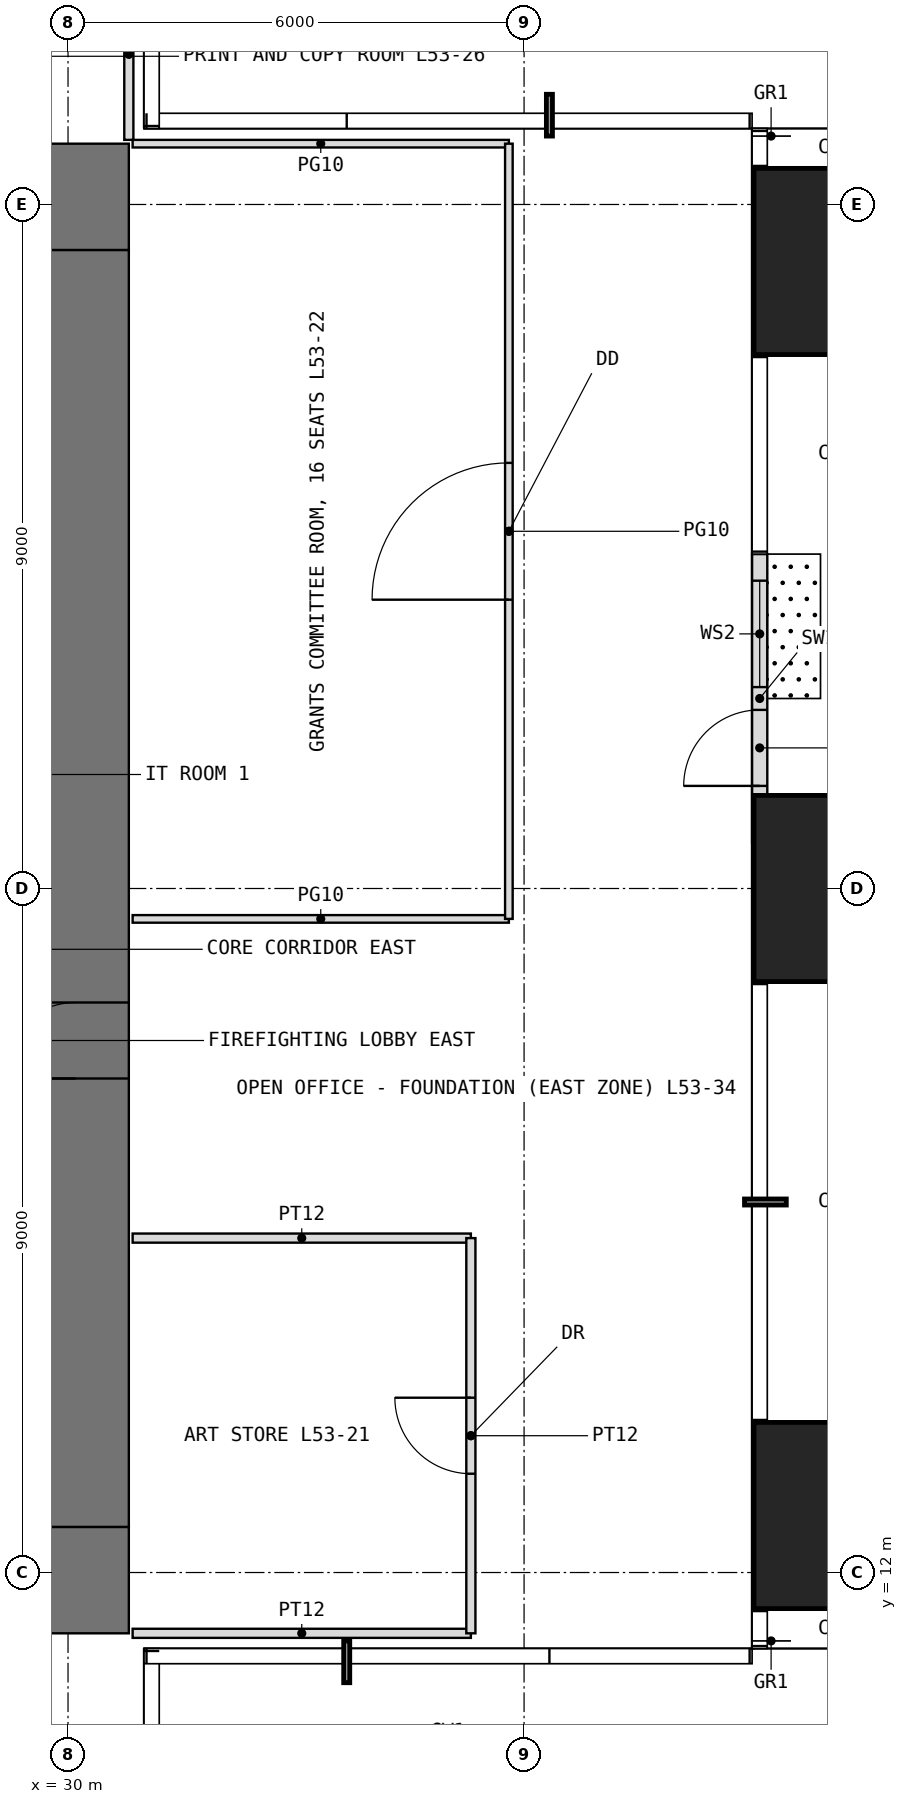
"""IFC4 building model, lengths in metres.
Left out: names, types, materials, properties, quantities, classifications, styles, units other than length and angle.
Written with IfcOpenShell. Run it as: python <this file> out.ifc"""

import sys

from ifc_helpers import new_model, si_unit, direction, frame, frame_2d, origin, origin_2d, place, context, subcontext, project, spatial, rectangle, extrude, element, fill, save


model = new_model("IFC4")
c1 = context("Model", 3, precision=1e-05, world=origin(), true_north=direction((0.0, 1.0)))
c2 = subcontext(c1, "Body", "Model", "MODEL_VIEW")
j1 = project(units=[si_unit("LENGTHUNIT", "METRE"), si_unit("PLANEANGLEUNIT", "RADIAN")], contexts=[c1])
p1 = place(None, origin())
s1 = spatial("IfcSite", under=j1, at=p1, CompositionType="ELEMENT")
p2 = place(p1, origin())
s2 = spatial("IfcBuilding", under=s1, at=p2, CompositionType="ELEMENT")
p3 = place(p2, frame((0.0, 0.0, 222.5)))
s3 = spatial("IfcBuildingStorey", under=s2, at=p3, CompositionType="ELEMENT", Elevation=222.5)
for number, where, z_axis, x_axis in (
    (1, (40.25, 12.75, 0.0), (0.0, 0.0, 1.0), (1.0, 0.0, 0.0)),
    (2, (40.25, 21.0, 0.0), (0.0, 0.0, 1.0), (1.0, 0.0, 0.0)),
    (3, (40.25, 29.25, 0.0), (0.0, 0.0, 1.0), (1.0, 0.0, 0.0)),
):
    element("IfcColumn", number, at=place(p3, frame(where, z_axis=z_axis, x_axis=x_axis)), inside=s3, PredefinedType="COLUMN", context=c2, shape_type="SweptSolid", body=[
        extrude(rectangle(XDim=2.45, YDim=2.45, at=origin_2d()), origin(), (0.0, 0.0, 1.0), 4.0),
    ])
p4 = place(p3, frame((39.1, 21.6, 0.0), z_axis=(0.0, 0.0, 1.0), x_axis=(0.0, 1.0, 0.0)))
e4 = element("IfcWall", 4, at=p4, inside=s3, PredefinedType="USERDEFINED", context=c2, shape_type="SweptSolid", body=[
    extrude(rectangle(XDim=3.8, YDim=0.2, at=frame_2d((1.9, 0.0))), origin(), (0.0, 0.0, 1.0), 3.75),
])
p5 = place(p4, frame((0.75, 0.0, 0.0)))
e5 = element("IfcOpeningElement", 5, at=p5, cuts=e4, PredefinedType="OPENING", context=c2, shape_type="SweptSolid", body=[
    extrude(rectangle(XDim=1.0, YDim=2.4, at=frame_2d((0.5, 1.2))), frame((0.0, 0.11, 0.0), z_axis=(0.0, -1.0, 0.0), x_axis=(1.0, 0.0, 0.0)), (0.0, 0.0, 1.0), 0.22),
])
p6 = place(p4, frame((2.05, 0.0, 0.3)))
e6 = element("IfcOpeningElement", 6, at=p6, cuts=e4, PredefinedType="OPENING", context=c2, shape_type="SweptSolid", body=[
    extrude(rectangle(XDim=1.4, YDim=2.7, at=frame_2d((0.7, 1.35))), frame((0.0, 0.11, 0.0), z_axis=(0.0, -1.0, 0.0), x_axis=(1.0, 0.0, 0.0)), (0.0, 0.0, 1.0), 0.22),
])
p7 = place(p3, frame((11.2, 11.9, -0.05), z_axis=(0.0, 0.0, 1.0), x_axis=(1.0, 0.0, 0.0)))
e7 = element("IfcWall", 7, at=p7, inside=s3, PredefinedType="SHEAR", context=c2, shape_type="SweptSolid", body=[
    extrude(rectangle(XDim=19.6, YDim=1.4, at=frame_2d((9.8, 0.0))), origin(), (0.0, 0.0, 1.0), 4.0),
])
p8 = place(p7, frame((8.8, 0.0, 0.05)))
e8 = element("IfcOpeningElement", 8, at=p8, cuts=e7, PredefinedType="OPENING", context=c2, shape_type="SweptSolid", body=[
    extrude(rectangle(XDim=2.0, YDim=2.2, at=frame_2d((1.0, 1.1))), frame((0.0, 0.71, 0.0), z_axis=(0.0, -1.0, 0.0), x_axis=(1.0, 0.0, 0.0)), (0.0, 0.0, 1.0), 1.42),
])
p9 = place(p3, frame((11.2, 30.1, -0.05), z_axis=(0.0, 0.0, 1.0), x_axis=(1.0, 0.0, 0.0)))
e9 = element("IfcWall", 9, at=p9, inside=s3, PredefinedType="SHEAR", context=c2, shape_type="SweptSolid", body=[
    extrude(rectangle(XDim=19.6, YDim=1.4, at=frame_2d((9.8, 0.0))), origin(), (0.0, 0.0, 1.0), 4.0),
])
p10 = place(p9, frame((8.8, 0.0, 0.05)))
e10 = element("IfcOpeningElement", 10, at=p10, cuts=e9, PredefinedType="OPENING", context=c2, shape_type="SweptSolid", body=[
    extrude(rectangle(XDim=2.0, YDim=2.2, at=frame_2d((1.0, 1.1))), frame((0.0, 0.71, 0.0), z_axis=(0.0, -1.0, 0.0), x_axis=(1.0, 0.0, 0.0)), (0.0, 0.0, 1.0), 1.42),
])
p11 = place(p3, frame((30.1, 12.6, -0.05), z_axis=(0.0, 0.0, 1.0), x_axis=(0.0, 1.0, 0.0)))
e11 = element("IfcWall", 11, at=p11, inside=s3, PredefinedType="SHEAR", context=c2, shape_type="SweptSolid", body=[
    extrude(rectangle(XDim=16.8, YDim=1.4, at=frame_2d((8.4, 0.0))), origin(), (0.0, 0.0, 1.0), 4.0),
])
p12 = place(p11, frame((5.9, 0.0, 0.05)))
e12 = element("IfcOpeningElement", 12, at=p12, cuts=e11, PredefinedType="OPENING", context=c2, shape_type="SweptSolid", body=[
    extrude(rectangle(XDim=1.0, YDim=2.2, at=frame_2d((0.5, 1.1))), frame((0.0, 0.71, 0.0), z_axis=(0.0, -1.0, 0.0), x_axis=(1.0, 0.0, 0.0)), (0.0, 0.0, 1.0), 1.42),
])
p13 = place(p3, frame((30.8, 30.85, 0.0), z_axis=(0.0, 0.0, 1.0), x_axis=(0.0, 1.0, 0.0)))
e13 = element("IfcWall", 13, at=p13, inside=s3, PredefinedType="PARTITIONING", context=c2, shape_type="SweptSolid", body=[
    extrude(rectangle(XDim=2.25, YDim=0.12, at=frame_2d((1.125, 0.0))), origin(), (0.0, 0.0, 1.0), 3.75),
])
for number, where, z_axis, x_axis in (
    (14, (30.85, 11.2, 0.0), (0.0, 0.0, 1.0), (1.0, 0.0, 0.0)),
    (15, (30.85, 16.4, 0.0), (0.0, 0.0, 1.0), (1.0, 0.0, 0.0)),
):
    element("IfcWall", number, at=place(p3, frame(where, z_axis=z_axis, x_axis=x_axis)), inside=s3, PredefinedType="PARTITIONING", context=c2, shape_type="SweptSolid", body=[
        extrude(rectangle(XDim=4.45, YDim=0.12, at=frame_2d((2.225, 0.0))), origin(), (0.0, 0.0, 1.0), 3.75),
    ])
for number, where, z_axis, x_axis in (
    (16, (30.85, 20.6, 0.0), (0.0, 0.0, 1.0), (1.0, 0.0, 0.0)),
    (17, (30.85, 30.8, 0.0), (0.0, 0.0, 1.0), (1.0, 0.0, 0.0)),
):
    element("IfcWall", number, at=place(p3, frame(where, z_axis=z_axis, x_axis=x_axis)), inside=s3, PredefinedType="PARTITIONING", context=c2, shape_type="SweptSolid", body=[
        extrude(rectangle(XDim=4.95, YDim=0.1, at=frame_2d((2.475, 0.0))), origin(), (0.0, 0.0, 1.0), 3.75),
    ])
p14 = place(p3, frame((35.3, 11.2, 0.0), z_axis=(0.0, 0.0, 1.0), x_axis=(0.0, 1.0, 0.0)))
e18 = element("IfcWall", 18, at=p14, inside=s3, PredefinedType="PARTITIONING", context=c2, shape_type="SweptSolid", body=[
    extrude(rectangle(XDim=5.2, YDim=0.12, at=frame_2d((2.6, 0.0))), origin(), (0.0, 0.0, 1.0), 3.75),
])
p15 = place(p14, frame((2.1, 0.0, 0.0)))
e19 = element("IfcOpeningElement", 19, at=p15, cuts=e18, PredefinedType="OPENING", context=c2, shape_type="SweptSolid", body=[
    extrude(rectangle(XDim=1.0, YDim=2.2, at=frame_2d((0.5, 1.1))), frame((0.0, 0.07, 0.0), z_axis=(0.0, -1.0, 0.0), x_axis=(1.0, 0.0, 0.0)), (0.0, 0.0, 1.0), 0.14),
])
p16 = place(p3, frame((35.8, 20.6, 0.0), z_axis=(0.0, 0.0, 1.0), x_axis=(0.0, 1.0, 0.0)))
e20 = element("IfcWall", 20, at=p16, inside=s3, PredefinedType="PARTITIONING", context=c2, shape_type="SweptSolid", body=[
    extrude(rectangle(XDim=10.2, YDim=0.1, at=frame_2d((5.1, 0.0))), origin(), (0.0, 0.0, 1.0), 3.75),
])
p17 = place(p16, frame((4.2, 0.0, 0.0)))
e21 = element("IfcOpeningElement", 21, at=p17, cuts=e20, PredefinedType="OPENING", context=c2, shape_type="SweptSolid", body=[
    extrude(rectangle(XDim=1.8, YDim=2.4, at=frame_2d((0.9, 1.2))), frame((0.0, 0.06, 0.0), z_axis=(0.0, -1.0, 0.0), x_axis=(1.0, 0.0, 0.0)), (0.0, 0.0, 1.0), 0.12),
])
p18 = place(p5, origin())
e22 = element("IfcDoor", 22, at=p18, inside=s3, OperationType="SINGLE_SWING_LEFT", PredefinedType="DOOR", context=c2, shape_type="SweptSolid", body=[
    extrude(rectangle(XDim=1.0, YDim=2.4, at=frame_2d((0.5, 1.2))), frame((0.0, 0.025, 0.0), z_axis=(0.0, -1.0, 0.0), x_axis=(1.0, 0.0, 0.0)), (0.0, 0.0, 1.0), 0.05),
])
fill(e5, e22)
p19 = place(p6, origin())
e23 = element("IfcWindow", 23, at=p19, inside=s3, PartitioningType="SINGLE_PANEL", PredefinedType="WINDOW", context=c2, shape_type="SweptSolid", body=[
    extrude(rectangle(XDim=1.4, YDim=2.7, at=frame_2d((0.7, 1.35))), frame((0.0, 0.03, 0.0), z_axis=(0.0, -1.0, 0.0), x_axis=(1.0, 0.0, 0.0)), (0.0, 0.0, 1.0), 0.06),
])
fill(e6, e23)
p20 = place(p12, origin())
e24 = element("IfcDoor", 24, at=p20, inside=s3, OperationType="SINGLE_SWING_LEFT", PredefinedType="DOOR", context=c2, shape_type="SweptSolid", body=[
    extrude(rectangle(XDim=1.0, YDim=2.2, at=frame_2d((0.5, 1.1))), frame((0.0, 0.025, 0.0), z_axis=(0.0, -1.0, 0.0), x_axis=(1.0, 0.0, 0.0)), (0.0, 0.0, 1.0), 0.05),
])
fill(e12, e24)
p21 = place(p15, origin())
e25 = element("IfcDoor", 25, at=p21, inside=s3, OperationType="SINGLE_SWING_RIGHT", PredefinedType="DOOR", context=c2, shape_type="SweptSolid", body=[
    extrude(rectangle(XDim=1.0, YDim=2.2, at=frame_2d((0.5, 1.1))), frame((0.0, 0.025, 0.0), z_axis=(0.0, -1.0, 0.0), x_axis=(1.0, 0.0, 0.0)), (0.0, 0.0, 1.0), 0.05),
])
fill(e19, e25)
p22 = place(p17, origin())
e26 = element("IfcDoor", 26, at=p22, inside=s3, OperationType="DOUBLE_DOOR_SINGLE_SWING", PredefinedType="DOOR", context=c2, shape_type="SweptSolid", body=[
    extrude(rectangle(XDim=1.8, YDim=2.4, at=frame_2d((0.9, 1.2))), frame((0.0, 0.025, 0.0), z_axis=(0.0, -1.0, 0.0), x_axis=(1.0, 0.0, 0.0)), (0.0, 0.0, 1.0), 0.05),
])
fill(e21, e26)
save(model, sys.argv[1])
